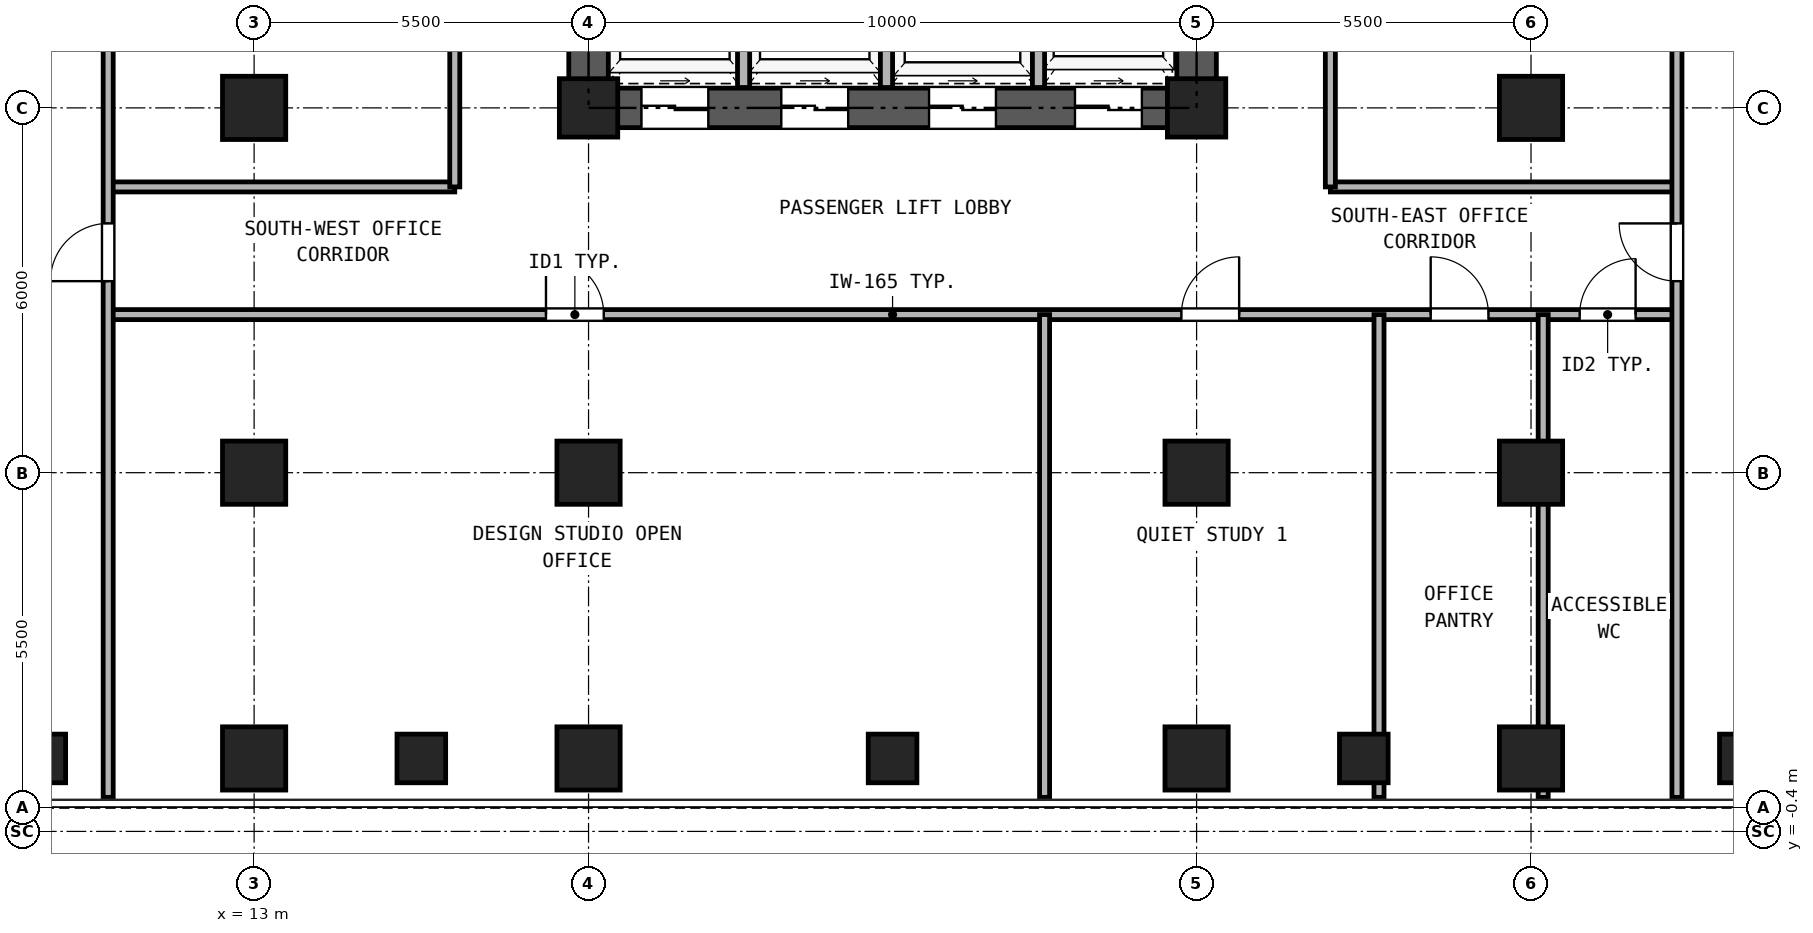
"""IFC4 building model, lengths in metres.
Left out: names, types, materials, properties, quantities, classifications, styles, units other than length and angle.
Written with IfcOpenShell. Run it as: python <this file> out.ifc"""

import sys

from ifc_helpers import new_model, si_unit, direction, frame, frame_2d, origin, origin_2d, place, context, subcontext, project, spatial, rectangle, hollow_rectangle, extrude, source, transform, mapped, element, fill, save


model = new_model("IFC4")
c1 = context("Model", 3, precision=1e-05, world=origin(), true_north=direction((0.0, 1.0)))
c2 = subcontext(c1, "Body", "Model", "MODEL_VIEW")
j1 = project(units=[si_unit("LENGTHUNIT", "METRE"), si_unit("PLANEANGLEUNIT", "RADIAN")], contexts=[c1])
p1 = place(None, origin())
s1 = spatial("IfcSite", under=j1, at=p1, CompositionType="ELEMENT")
p2 = place(p1, origin())
s2 = spatial("IfcBuilding", under=s1, at=p2, CompositionType="ELEMENT")
p3 = place(p2, frame((0.0, 0.0, 47.7)))
s3 = spatial("IfcBuildingStorey", under=s2, at=p3, CompositionType="ELEMENT", Elevation=47.7)
m1 = source(origin(), c2, "Body", "SweptSolid", [
    extrude(hollow_rectangle(XDim=1.04, YDim=1.04, WallThickness=0.065, at=origin_2d()), origin(), (0.0, 0.0, 1.0), 3.32),
])
for number, where, z_axis, x_axis in (
    (1, (13.0, 0.8, 0.0), (0.0, 0.0, 1.0), (1.0, 0.0, 0.0)),
    (2, (18.5, 0.8, 0.0), (0.0, 0.0, 1.0), (1.0, 0.0, 0.0)),
    (3, (28.5, 0.8, 0.0), (0.0, 0.0, 1.0), (1.0, 0.0, 0.0)),
    (4, (34.0, 0.8, 0.0), (0.0, 0.0, 1.0), (1.0, 0.0, 0.0)),
    (5, (13.0, 5.5, 0.0), (0.0, 0.0, 1.0), (1.0, 0.0, 0.0)),
    (6, (13.0, 11.5, 0.0), (0.0, 0.0, 1.0), (1.0, 0.0, 0.0)),
    (7, (18.5, 5.5, 0.0), (0.0, 0.0, 1.0), (1.0, 0.0, 0.0)),
):
    element("IfcColumn", number, at=place(p3, frame(where, z_axis=z_axis, x_axis=x_axis)), inside=s3, PredefinedType="COLUMN", context=c2, shape_type="MappedRepresentation", body=[
        mapped(m1, transform((0.0, 0.0, 0.0), x_axis=(1.0, 0.0, 0.0), y_axis=(0.0, 1.0, 0.0), z_axis=(0.0, 0.0, 1.0), scale=1.0)),
    ])
m2 = source(origin(), c2, "Body", "SweptSolid", [
    extrude(hollow_rectangle(XDim=0.96, YDim=0.96, WallThickness=0.06, at=origin_2d()), origin(), (0.0, 0.0, 1.0), 3.32),
])
p4 = place(p3, frame((18.5, 11.5, 0.0), z_axis=(0.0, 0.0, 1.0), x_axis=(1.0, 0.0, 0.0)))
e8 = element("IfcColumn", 8, at=p4, inside=s3, PredefinedType="COLUMN", context=c2, shape_type="MappedRepresentation", body=[
    mapped(m2, transform((0.0, 0.0, 0.0), x_axis=(1.0, 0.0, 0.0), y_axis=(0.0, 1.0, 0.0), z_axis=(0.0, 0.0, 1.0), scale=1.0)),
])
p5 = place(p3, frame((28.5, 5.5, 0.0), z_axis=(0.0, 0.0, 1.0), x_axis=(1.0, 0.0, 0.0)))
e9 = element("IfcColumn", 9, at=p5, inside=s3, PredefinedType="COLUMN", context=c2, shape_type="MappedRepresentation", body=[
    mapped(m1, transform((0.0, 0.0, 0.0), x_axis=(1.0, 0.0, 0.0), y_axis=(0.0, 1.0, 0.0), z_axis=(0.0, 0.0, 1.0), scale=1.0)),
])
p6 = place(p3, frame((28.5, 11.5, 0.0), z_axis=(0.0, 0.0, 1.0), x_axis=(1.0, 0.0, 0.0)))
e10 = element("IfcColumn", 10, at=p6, inside=s3, PredefinedType="COLUMN", context=c2, shape_type="MappedRepresentation", body=[
    mapped(m2, transform((0.0, 0.0, 0.0), x_axis=(1.0, 0.0, 0.0), y_axis=(0.0, 1.0, 0.0), z_axis=(0.0, 0.0, 1.0), scale=1.0)),
])
for number, where, z_axis, x_axis in (
    (11, (34.0, 5.5, 0.0), (0.0, 0.0, 1.0), (1.0, 0.0, 0.0)),
    (12, (34.0, 11.5, 0.0), (0.0, 0.0, 1.0), (1.0, 0.0, 0.0)),
):
    element("IfcColumn", number, at=place(p3, frame(where, z_axis=z_axis, x_axis=x_axis)), inside=s3, PredefinedType="COLUMN", context=c2, shape_type="MappedRepresentation", body=[
        mapped(m1, transform((0.0, 0.0, 0.0), x_axis=(1.0, 0.0, 0.0), y_axis=(0.0, 1.0, 0.0), z_axis=(0.0, 0.0, 1.0), scale=1.0)),
    ])
m3 = source(origin(), c2, "Body", "SweptSolid", [
    extrude(hollow_rectangle(XDim=0.8, YDim=0.8, WallThickness=0.045, at=origin_2d()), origin(), (0.0, 0.0, 1.0), 3.32),
])
for number, where, z_axis, x_axis in (
    (13, (9.5, 0.8, 0.0), (0.0, 0.0, 1.0), (1.0, 0.0, 0.0)),
    (14, (15.75, 0.8, 0.0), (0.0, 0.0, 1.0), (1.0, 0.0, 0.0)),
    (15, (23.5, 0.8, 0.0), (0.0, 0.0, 1.0), (1.0, 0.0, 0.0)),
    (16, (31.25, 0.8, 0.0), (0.0, 0.0, 1.0), (1.0, 0.0, 0.0)),
    (17, (37.5, 0.8, 0.0), (0.0, 0.0, 1.0), (1.0, 0.0, 0.0)),
):
    element("IfcColumn", number, at=place(p3, frame(where, z_axis=z_axis, x_axis=x_axis)), inside=s3, PredefinedType="COLUMN", context=c2, shape_type="MappedRepresentation", body=[
        mapped(m3, transform((0.0, 0.0, 0.0), x_axis=(1.0, 0.0, 0.0), y_axis=(0.0, 1.0, 0.0), z_axis=(0.0, 0.0, 1.0), scale=1.0)),
    ])
p7 = place(p3, frame((18.175, 11.5, 0.0), z_axis=(0.0, 0.0, 1.0), x_axis=(1.0, 0.0, 0.0)))
e18 = element("IfcWall", 18, at=p7, inside=s3, PredefinedType="SHEAR", context=c2, shape_type="SweptSolid", body=[
    extrude(rectangle(XDim=10.65, YDim=0.65, at=frame_2d((5.325, 0.0))), origin(), (0.0, 0.0, 1.0), 3.32),
])
p8 = place(p7, frame((1.195, 0.0, 0.0)))
e19 = element("IfcOpeningElement", 19, at=p8, cuts=e18, PredefinedType="OPENING", context=c2, shape_type="SweptSolid", body=[
    extrude(rectangle(XDim=1.1, YDim=2.25, at=frame_2d((0.55, 1.125))), frame((0.0, 0.335, 0.0), z_axis=(0.0, -1.0, 0.0), x_axis=(1.0, 0.0, 0.0)), (0.0, 0.0, 1.0), 0.67),
])
p9 = place(p7, frame((3.495, 0.0, 0.0)))
e20 = element("IfcOpeningElement", 20, at=p9, cuts=e18, PredefinedType="OPENING", context=c2, shape_type="SweptSolid", body=[
    extrude(rectangle(XDim=1.1, YDim=2.25, at=frame_2d((0.55, 1.125))), frame((0.0, 0.335, 0.0), z_axis=(0.0, -1.0, 0.0), x_axis=(1.0, 0.0, 0.0)), (0.0, 0.0, 1.0), 0.67),
])
p10 = place(p7, frame((5.925, 0.0, 0.0)))
e21 = element("IfcOpeningElement", 21, at=p10, cuts=e18, PredefinedType="OPENING", context=c2, shape_type="SweptSolid", body=[
    extrude(rectangle(XDim=1.1, YDim=2.25, at=frame_2d((0.55, 1.125))), frame((0.0, 0.335, 0.0), z_axis=(0.0, -1.0, 0.0), x_axis=(1.0, 0.0, 0.0)), (0.0, 0.0, 1.0), 0.67),
])
p11 = place(p7, frame((8.325, 0.0, 0.0)))
e22 = element("IfcOpeningElement", 22, at=p11, cuts=e18, PredefinedType="OPENING", context=c2, shape_type="SweptSolid", body=[
    extrude(rectangle(XDim=1.1, YDim=2.25, at=frame_2d((0.55, 1.125))), frame((0.0, 0.335, 0.0), z_axis=(0.0, -1.0, 0.0), x_axis=(1.0, 0.0, 0.0)), (0.0, 0.0, 1.0), 0.67),
])
p12 = place(p3, frame((18.5, 11.825, 0.0), z_axis=(0.0, 0.0, 1.0), x_axis=(0.0, 1.0, 0.0)))
e23 = element("IfcWall", 23, at=p12, inside=s3, PredefinedType="SHEAR", context=c2, shape_type="SweptSolid", body=[
    extrude(rectangle(XDim=16.6, YDim=0.65, at=frame_2d((8.3, 0.0))), origin(), (0.0, 0.0, 1.0), 3.32),
])
p13 = place(p12, frame((7.325, 0.0, 0.0)))
e24 = element("IfcOpeningElement", 24, at=p13, cuts=e23, PredefinedType="OPENING", context=c2, shape_type="SweptSolid", body=[
    extrude(rectangle(XDim=1.15, YDim=2.2, at=frame_2d((0.575, 1.1))), frame((0.0, 0.335, 0.0), z_axis=(0.0, -1.0, 0.0), x_axis=(1.0, 0.0, 0.0)), (0.0, 0.0, 1.0), 0.67),
])
p14 = place(p3, frame((28.5, 11.825, 0.0), z_axis=(0.0, 0.0, 1.0), x_axis=(0.0, 1.0, 0.0)))
e25 = element("IfcWall", 25, at=p14, inside=s3, PredefinedType="SHEAR", context=c2, shape_type="SweptSolid", body=[
    extrude(rectangle(XDim=16.6, YDim=0.65, at=frame_2d((8.3, 0.0))), origin(), (0.0, 0.0, 1.0), 3.32),
])
p15 = place(p14, frame((7.325, 0.0, 0.0)))
e26 = element("IfcOpeningElement", 26, at=p15, cuts=e25, PredefinedType="OPENING", context=c2, shape_type="SweptSolid", body=[
    extrude(rectangle(XDim=1.15, YDim=2.2, at=frame_2d((0.575, 1.1))), frame((0.0, 0.335, 0.0), z_axis=(0.0, -1.0, 0.0), x_axis=(1.0, 0.0, 0.0)), (0.0, 0.0, 1.0), 0.67),
])
for number, where, z_axis, x_axis in (
    (27, (21.05, 11.835, 0.0), (0.0, 0.0, 1.0), (0.0, 1.0, 0.0)),
    (28, (23.4, 11.835, 0.0), (0.0, 0.0, 1.0), (0.0, 1.0, 0.0)),
    (29, (25.9, 11.835, 0.0), (0.0, 0.0, 1.0), (0.0, 1.0, 0.0)),
):
    element("IfcWall", number, at=place(p3, frame(where, z_axis=z_axis, x_axis=x_axis)), inside=s3, PredefinedType="PARTITIONING", context=c2, shape_type="SweptSolid", body=[
        extrude(rectangle(XDim=3.165, YDim=0.2, at=frame_2d((1.583, 0.0))), origin(), (0.0, 0.0, 1.0), 3.32),
    ])
p16 = place(p3, frame((10.6, 8.1, 0.0), z_axis=(0.0, 0.0, 1.0), x_axis=(1.0, 0.0, 0.0)))
e30 = element("IfcWall", 30, at=p16, inside=s3, PredefinedType="PARTITIONING", context=c2, shape_type="SweptSolid", body=[
    extrude(rectangle(XDim=25.8, YDim=0.165, at=frame_2d((12.9, 0.0))), origin(), (0.0, 0.0, 1.0), 3.32),
])
p17 = place(p16, frame((7.2, 0.0, 0.0)))
e31 = element("IfcOpeningElement", 31, at=p17, cuts=e30, PredefinedType="OPENING", context=c2, shape_type="SweptSolid", body=[
    extrude(rectangle(XDim=0.95, YDim=2.15, at=frame_2d((0.475, 1.075))), frame((0.0, 0.093, 0.0), z_axis=(0.0, -1.0, 0.0), x_axis=(1.0, 0.0, 0.0)), (0.0, 0.0, 1.0), 0.185),
])
p18 = place(p16, frame((17.65, 0.0, 0.0)))
e32 = element("IfcOpeningElement", 32, at=p18, cuts=e30, PredefinedType="OPENING", context=c2, shape_type="SweptSolid", body=[
    extrude(rectangle(XDim=0.95, YDim=2.15, at=frame_2d((0.475, 1.075))), frame((0.0, 0.093, 0.0), z_axis=(0.0, -1.0, 0.0), x_axis=(1.0, 0.0, 0.0)), (0.0, 0.0, 1.0), 0.185),
])
p19 = place(p16, frame((21.75, 0.0, 0.0)))
e33 = element("IfcOpeningElement", 33, at=p19, cuts=e30, PredefinedType="OPENING", context=c2, shape_type="SweptSolid", body=[
    extrude(rectangle(XDim=0.95, YDim=2.15, at=frame_2d((0.475, 1.075))), frame((0.0, 0.093, 0.0), z_axis=(0.0, -1.0, 0.0), x_axis=(1.0, 0.0, 0.0)), (0.0, 0.0, 1.0), 0.185),
])
p20 = place(p16, frame((24.2, 0.0, 0.0)))
e34 = element("IfcOpeningElement", 34, at=p20, cuts=e30, PredefinedType="OPENING", context=c2, shape_type="SweptSolid", body=[
    extrude(rectangle(XDim=0.92, YDim=2.1, at=frame_2d((0.46, 1.05))), frame((0.0, 0.093, 0.0), z_axis=(0.0, -1.0, 0.0), x_axis=(1.0, 0.0, 0.0)), (0.0, 0.0, 1.0), 0.185),
])
for number, where, z_axis, x_axis in (
    (35, (10.6, 10.2, 0.0), (0.0, 0.0, 1.0), (1.0, 0.0, 0.0)),
    (36, (30.7, 10.2, 0.0), (0.0, 0.0, 1.0), (1.0, 0.0, 0.0)),
):
    element("IfcWall", number, at=place(p3, frame(where, z_axis=z_axis, x_axis=x_axis)), inside=s3, PredefinedType="PARTITIONING", context=c2, shape_type="SweptSolid", body=[
        extrude(rectangle(XDim=5.7, YDim=0.165, at=frame_2d((2.85, 0.0))), origin(), (0.0, 0.0, 1.0), 3.32),
    ])
p21 = place(p3, frame((16.3, 10.2, 0.0), z_axis=(0.0, 0.0, 1.0), x_axis=(0.0, 1.0, 0.0)))
e37 = element("IfcWall", 37, at=p21, inside=s3, PredefinedType="PARTITIONING", context=c2, shape_type="SweptSolid", body=[
    extrude(rectangle(XDim=19.7, YDim=0.165, at=frame_2d((9.85, 0.0))), origin(), (0.0, 0.0, 1.0), 3.32),
])
p22 = place(p21, frame((5.859, 0.0, 0.0)))
e38 = element("IfcOpeningElement", 38, at=p22, cuts=e37, PredefinedType="OPENING", context=c2, shape_type="SweptSolid", body=[
    extrude(rectangle(XDim=0.95, YDim=2.15, at=frame_2d((0.475, 1.075))), frame((0.0, 0.093, 0.0), z_axis=(0.0, -1.0, 0.0), x_axis=(1.0, 0.0, 0.0)), (0.0, 0.0, 1.0), 0.185),
])
p23 = place(p21, frame((15.709, 0.0, 0.0)))
e39 = element("IfcOpeningElement", 39, at=p23, cuts=e37, PredefinedType="OPENING", context=c2, shape_type="SweptSolid", body=[
    extrude(rectangle(XDim=0.95, YDim=2.15, at=frame_2d((0.475, 1.075))), frame((0.0, 0.093, 0.0), z_axis=(0.0, -1.0, 0.0), x_axis=(1.0, 0.0, 0.0)), (0.0, 0.0, 1.0), 0.185),
])
p24 = place(p3, frame((30.7, 10.2, 0.0), z_axis=(0.0, 0.0, 1.0), x_axis=(0.0, 1.0, 0.0)))
e40 = element("IfcWall", 40, at=p24, inside=s3, PredefinedType="PARTITIONING", context=c2, shape_type="SweptSolid", body=[
    extrude(rectangle(XDim=19.7, YDim=0.165, at=frame_2d((9.85, 0.0))), origin(), (0.0, 0.0, 1.0), 3.32),
])
p25 = place(p24, frame((9.35, 0.0, 0.0)))
e41 = element("IfcOpeningElement", 41, at=p25, cuts=e40, PredefinedType="OPENING", context=c2, shape_type="SweptSolid", body=[
    extrude(rectangle(XDim=0.95, YDim=2.15, at=frame_2d((0.475, 1.075))), frame((0.0, 0.093, 0.0), z_axis=(0.0, -1.0, 0.0), x_axis=(1.0, 0.0, 0.0)), (0.0, 0.0, 1.0), 0.185),
])
p26 = place(p3, frame((10.6, 0.16, 0.0), z_axis=(0.0, 0.0, 1.0), x_axis=(0.0, 1.0, 0.0)))
e42 = element("IfcWall", 42, at=p26, inside=s3, PredefinedType="PARTITIONING", context=c2, shape_type="SweptSolid", body=[
    extrude(rectangle(XDim=40.18, YDim=0.165, at=frame_2d((20.09, 0.0))), origin(), (0.0, 0.0, 1.0), 3.32),
])
p27 = place(p26, frame((8.49, 0.0, 0.0)))
e43 = element("IfcOpeningElement", 43, at=p27, cuts=e42, PredefinedType="OPENING", context=c2, shape_type="SweptSolid", body=[
    extrude(rectangle(XDim=0.95, YDim=2.15, at=frame_2d((0.475, 1.075))), frame((0.0, 0.093, 0.0), z_axis=(0.0, -1.0, 0.0), x_axis=(1.0, 0.0, 0.0)), (0.0, 0.0, 1.0), 0.185),
])
p28 = place(p26, frame((30.29, 0.0, 0.0)))
e44 = element("IfcOpeningElement", 44, at=p28, cuts=e42, PredefinedType="OPENING", context=c2, shape_type="SweptSolid", body=[
    extrude(rectangle(XDim=0.95, YDim=2.15, at=frame_2d((0.475, 1.075))), frame((0.0, 0.093, 0.0), z_axis=(0.0, -1.0, 0.0), x_axis=(1.0, 0.0, 0.0)), (0.0, 0.0, 1.0), 0.185),
])
p29 = place(p3, frame((36.4, 0.16, 0.0), z_axis=(0.0, 0.0, 1.0), x_axis=(0.0, 1.0, 0.0)))
e45 = element("IfcWall", 45, at=p29, inside=s3, PredefinedType="PARTITIONING", context=c2, shape_type="SweptSolid", body=[
    extrude(rectangle(XDim=40.18, YDim=0.165, at=frame_2d((20.09, 0.0))), origin(), (0.0, 0.0, 1.0), 3.32),
])
p30 = place(p29, frame((8.49, 0.0, 0.0)))
e46 = element("IfcOpeningElement", 46, at=p30, cuts=e45, PredefinedType="OPENING", context=c2, shape_type="SweptSolid", body=[
    extrude(rectangle(XDim=0.95, YDim=2.15, at=frame_2d((0.475, 1.075))), frame((0.0, 0.093, 0.0), z_axis=(0.0, -1.0, 0.0), x_axis=(1.0, 0.0, 0.0)), (0.0, 0.0, 1.0), 0.185),
])
p31 = place(p29, frame((30.29, 0.0, 0.0)))
e47 = element("IfcOpeningElement", 47, at=p31, cuts=e45, PredefinedType="OPENING", context=c2, shape_type="SweptSolid", body=[
    extrude(rectangle(XDim=0.95, YDim=2.15, at=frame_2d((0.475, 1.075))), frame((0.0, 0.093, 0.0), z_axis=(0.0, -1.0, 0.0), x_axis=(1.0, 0.0, 0.0)), (0.0, 0.0, 1.0), 0.185),
])
for number, where, z_axis, x_axis in (
    (48, (26.0, 0.16, 0.0), (0.0, 0.0, 1.0), (0.0, 1.0, 0.0)),
    (49, (31.5, 0.16, 0.0), (0.0, 0.0, 1.0), (0.0, 1.0, 0.0)),
):
    element("IfcWall", number, at=place(p3, frame(where, z_axis=z_axis, x_axis=x_axis)), inside=s3, PredefinedType="PARTITIONING", context=c2, shape_type="SweptSolid", body=[
        extrude(rectangle(XDim=7.94, YDim=0.165, at=frame_2d((3.97, 0.0))), origin(), (0.0, 0.0, 1.0), 3.32),
    ])
p32 = place(p3, frame((34.2, 0.16, 0.0), z_axis=(0.0, 0.0, 1.0), x_axis=(0.0, 1.0, 0.0)))
e50 = element("IfcWall", 50, at=p32, inside=s3, PredefinedType="PARTITIONING", context=c2, shape_type="SweptSolid", body=[
    extrude(rectangle(XDim=7.94, YDim=0.165, at=frame_2d((3.97, 0.0))), origin(), (0.0, 0.0, 1.0), 2.539),
])
p33 = place(p8, frame((1.1, 0.0, 0.0), z_axis=(0.0, 0.0, 1.0), x_axis=(-1.0, 0.0, 0.0)))
e51 = element("IfcDoor", 51, at=p33, inside=s3, OperationType="DOUBLE_DOOR_SLIDING", PredefinedType="DOOR", context=c2, shape_type="SweptSolid", body=[
    extrude(rectangle(XDim=1.1, YDim=2.25, at=frame_2d((0.55, 1.125))), frame((0.0, 0.025, 0.0), z_axis=(0.0, -1.0, 0.0), x_axis=(1.0, 0.0, 0.0)), (0.0, 0.0, 1.0), 0.05),
])
fill(e19, e51)
p34 = place(p9, frame((1.1, 0.0, 0.0), z_axis=(0.0, 0.0, 1.0), x_axis=(-1.0, 0.0, 0.0)))
e52 = element("IfcDoor", 52, at=p34, inside=s3, OperationType="DOUBLE_DOOR_SLIDING", PredefinedType="DOOR", context=c2, shape_type="SweptSolid", body=[
    extrude(rectangle(XDim=1.1, YDim=2.25, at=frame_2d((0.55, 1.125))), frame((0.0, 0.025, 0.0), z_axis=(0.0, -1.0, 0.0), x_axis=(1.0, 0.0, 0.0)), (0.0, 0.0, 1.0), 0.05),
])
fill(e20, e52)
p35 = place(p10, frame((1.1, 0.0, 0.0), z_axis=(0.0, 0.0, 1.0), x_axis=(-1.0, 0.0, 0.0)))
e53 = element("IfcDoor", 53, at=p35, inside=s3, OperationType="DOUBLE_DOOR_SLIDING", PredefinedType="DOOR", context=c2, shape_type="SweptSolid", body=[
    extrude(rectangle(XDim=1.1, YDim=2.25, at=frame_2d((0.55, 1.125))), frame((0.0, 0.025, 0.0), z_axis=(0.0, -1.0, 0.0), x_axis=(1.0, 0.0, 0.0)), (0.0, 0.0, 1.0), 0.05),
])
fill(e21, e53)
p36 = place(p11, frame((1.1, 0.0, 0.0), z_axis=(0.0, 0.0, 1.0), x_axis=(-1.0, 0.0, 0.0)))
e54 = element("IfcDoor", 54, at=p36, inside=s3, OperationType="DOUBLE_DOOR_SLIDING", PredefinedType="DOOR", context=c2, shape_type="SweptSolid", body=[
    extrude(rectangle(XDim=1.1, YDim=2.25, at=frame_2d((0.55, 1.125))), frame((0.0, 0.025, 0.0), z_axis=(0.0, -1.0, 0.0), x_axis=(1.0, 0.0, 0.0)), (0.0, 0.0, 1.0), 0.05),
])
fill(e22, e54)
p37 = place(p17, frame((0.95, 0.0, 0.0), z_axis=(0.0, 0.0, 1.0), x_axis=(-1.0, 0.0, 0.0)))
e55 = element("IfcDoor", 55, at=p37, inside=s3, OperationType="SINGLE_SWING_LEFT", PredefinedType="DOOR", context=c2, shape_type="SweptSolid", body=[
    extrude(rectangle(XDim=0.95, YDim=2.15, at=frame_2d((0.475, 1.075))), frame((0.0, 0.025, 0.0), z_axis=(0.0, -1.0, 0.0), x_axis=(1.0, 0.0, 0.0)), (0.0, 0.0, 1.0), 0.05),
])
fill(e31, e55)
p38 = place(p18, frame((0.95, 0.0, 0.0), z_axis=(0.0, 0.0, 1.0), x_axis=(-1.0, 0.0, 0.0)))
e56 = element("IfcDoor", 56, at=p38, inside=s3, OperationType="SINGLE_SWING_RIGHT", PredefinedType="DOOR", context=c2, shape_type="SweptSolid", body=[
    extrude(rectangle(XDim=0.95, YDim=2.15, at=frame_2d((0.475, 1.075))), frame((0.0, 0.025, 0.0), z_axis=(0.0, -1.0, 0.0), x_axis=(1.0, 0.0, 0.0)), (0.0, 0.0, 1.0), 0.05),
])
fill(e32, e56)
p39 = place(p19, frame((0.95, 0.0, 0.0), z_axis=(0.0, 0.0, 1.0), x_axis=(-1.0, 0.0, 0.0)))
e57 = element("IfcDoor", 57, at=p39, inside=s3, OperationType="SINGLE_SWING_LEFT", PredefinedType="DOOR", context=c2, shape_type="SweptSolid", body=[
    extrude(rectangle(XDim=0.95, YDim=2.15, at=frame_2d((0.475, 1.075))), frame((0.0, 0.025, 0.0), z_axis=(0.0, -1.0, 0.0), x_axis=(1.0, 0.0, 0.0)), (0.0, 0.0, 1.0), 0.05),
])
fill(e33, e57)
p40 = place(p20, frame((0.92, 0.0, 0.0), z_axis=(0.0, 0.0, 1.0), x_axis=(-1.0, 0.0, 0.0)))
e58 = element("IfcDoor", 58, at=p40, inside=s3, OperationType="SINGLE_SWING_RIGHT", PredefinedType="DOOR", context=c2, shape_type="SweptSolid", body=[
    extrude(rectangle(XDim=0.92, YDim=2.1, at=frame_2d((0.46, 1.05))), frame((0.0, 0.025, 0.0), z_axis=(0.0, -1.0, 0.0), x_axis=(1.0, 0.0, 0.0)), (0.0, 0.0, 1.0), 0.05),
])
fill(e34, e58)
p41 = place(p27, frame((0.95, 0.0, 0.0), z_axis=(0.0, 0.0, 1.0), x_axis=(-1.0, 0.0, 0.0)))
e59 = element("IfcDoor", 59, at=p41, inside=s3, OperationType="SINGLE_SWING_LEFT", PredefinedType="DOOR", context=c2, shape_type="SweptSolid", body=[
    extrude(rectangle(XDim=0.95, YDim=2.15, at=frame_2d((0.475, 1.075))), frame((0.0, 0.025, 0.0), z_axis=(0.0, -1.0, 0.0), x_axis=(1.0, 0.0, 0.0)), (0.0, 0.0, 1.0), 0.05),
])
fill(e43, e59)
p42 = place(p30, origin())
e60 = element("IfcDoor", 60, at=p42, inside=s3, OperationType="SINGLE_SWING_RIGHT", PredefinedType="DOOR", context=c2, shape_type="SweptSolid", body=[
    extrude(rectangle(XDim=0.95, YDim=2.15, at=frame_2d((0.475, 1.075))), frame((0.0, 0.025, 0.0), z_axis=(0.0, -1.0, 0.0), x_axis=(1.0, 0.0, 0.0)), (0.0, 0.0, 1.0), 0.05),
])
fill(e46, e60)
save(model, sys.argv[1])
